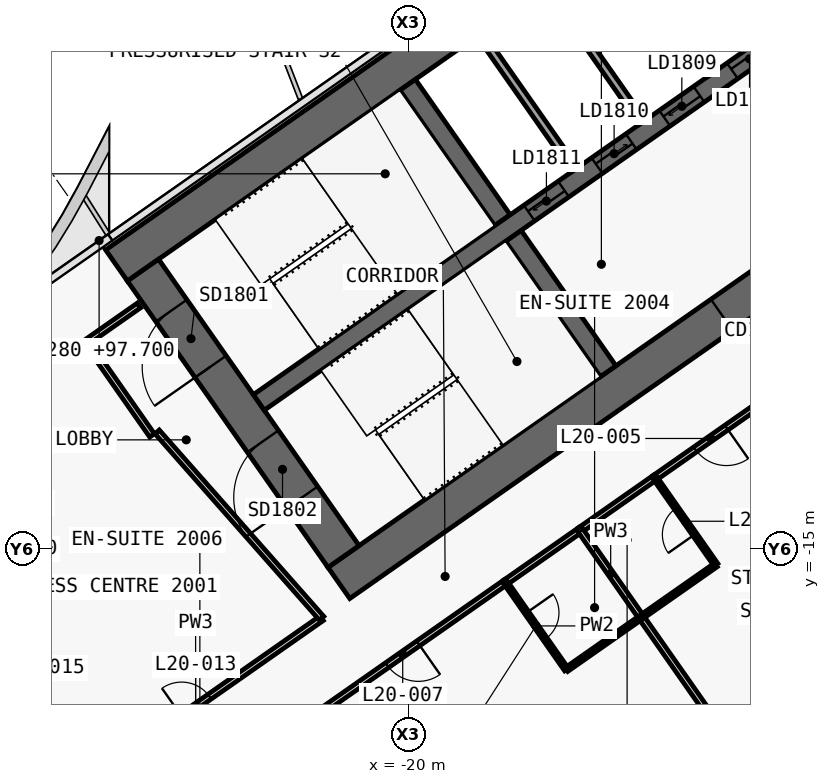
"""IFC4 building model, lengths in metres.
Left out: names, types, materials, properties, quantities, classifications, styles, units other than length and angle.
Written with IfcOpenShell. Run it as: python <this file> out.ifc"""

import sys

from ifc_helpers import new_model, si_unit, direction, frame, frame_2d, origin, place, context, subcontext, project, spatial, polyline, rectangle, outline, extrude, element, fill, save


model = new_model("IFC4")
c1 = context("Model", 3, precision=1e-05, world=origin(), true_north=direction((0.0, 1.0)))
c2 = subcontext(c1, "Body", "Model", "MODEL_VIEW")
j1 = project(units=[si_unit("LENGTHUNIT", "METRE"), si_unit("PLANEANGLEUNIT", "RADIAN")], contexts=[c1])
p1 = place(None, origin())
s1 = spatial("IfcSite", under=j1, at=p1, CompositionType="ELEMENT")
p2 = place(p1, origin())
s2 = spatial("IfcBuilding", under=s1, at=p2, CompositionType="ELEMENT")
p3 = place(p2, frame((0.0, 0.0, 97.7)))
s3 = spatial("IfcBuildingStorey", under=s2, at=p3, CompositionType="ELEMENT", Elevation=97.7)
p4 = place(p3, frame((0.037, 11.867, 0.0), z_axis=(0.0, 0.0, 1.0), x_axis=(-0.819155306259, -0.573571777746, 0.0)))
e1 = element("IfcWall", 1, at=p4, inside=s3, PredefinedType="SHEAR", context=c2, shape_type="SweptSolid", body=[
    extrude(outline(polyline([(33.837, 0.5), (0.7, 0.5), (0.0, -0.5), (33.837, -0.5), (33.837, 0.5)])), origin(), (0.0, 0.0, 1.0), 3.6),
])
p5 = place(p3, frame((0.037, -0.585, 0.0), z_axis=(0.0, 0.0, 1.0), x_axis=(-0.819157152511, -0.573569140985, 0.0)))
e2 = element("IfcWall", 2, at=p5, inside=s3, PredefinedType="SHEAR", context=c2, shape_type="SweptSolid", body=[
    extrude(outline(polyline([(26.695, 0.5), (0.7, 0.5), (0.0, -0.5), (26.695, -0.5), (26.695, 0.5)])), origin(), (0.0, 0.0, 1.0), 3.6),
])
p6 = place(p5, frame((2.995, 0.0, 0.0)))
e3 = element("IfcOpeningElement", 3, at=p6, cuts=e2, PredefinedType="OPENING", context=c2, shape_type="SweptSolid", body=[
    extrude(rectangle(XDim=2.4, YDim=2.1, at=frame_2d((1.2, 1.05))), frame((0.0, 0.51, 0.0), z_axis=(0.0, -1.0, 0.0), x_axis=(1.0, 0.0, 0.0)), (0.0, 0.0, 1.0), 1.02),
])
p7 = place(p5, frame((11.995, 0.0, 0.0)))
e4 = element("IfcOpeningElement", 4, at=p7, cuts=e2, PredefinedType="OPENING", context=c2, shape_type="SweptSolid", body=[
    extrude(rectangle(XDim=2.4, YDim=2.1, at=frame_2d((1.2, 1.05))), frame((0.0, 0.51, 0.0), z_axis=(0.0, -1.0, 0.0), x_axis=(1.0, 0.0, 0.0)), (0.0, 0.0, 1.0), 1.02),
])
p8 = place(p3, frame((-21.708, -15.2, 0.0), z_axis=(0.0, 0.0, 1.0), x_axis=(-0.573576324356, 0.819152122709, 0.0)))
e5 = element("IfcWall", 5, at=p8, inside=s3, PredefinedType="SHEAR", context=c2, shape_type="SweptSolid", body=[
    extrude(outline(polyline([(0.0, 0.5), (0.0, -0.5), (9.2, -0.5), (9.2, 0.5), (0.0, 0.5)])), origin(), (0.0, 0.0, 1.0), 3.6),
])
p9 = place(p8, frame((6.1, 0.0, 0.0)))
e6 = element("IfcOpeningElement", 6, at=p9, cuts=e5, PredefinedType="OPENING", context=c2, shape_type="SweptSolid", body=[
    extrude(rectangle(XDim=1.8, YDim=2.1, at=frame_2d((0.9, 1.05))), frame((0.0, 0.51, 0.0), z_axis=(0.0, -1.0, 0.0), x_axis=(1.0, 0.0, 0.0)), (0.0, 0.0, 1.0), 1.02),
])
p10 = place(p8, frame((1.9, 0.0, 0.0)))
e7 = element("IfcOpeningElement", 7, at=p10, cuts=e5, PredefinedType="OPENING", context=c2, shape_type="SweptSolid", body=[
    extrude(rectangle(XDim=1.8, YDim=2.1, at=frame_2d((0.9, 1.05))), frame((0.0, 0.51, 0.0), z_axis=(0.0, -1.0, 0.0), x_axis=(1.0, 0.0, 0.0)), (0.0, 0.0, 1.0), 1.02),
])
p11 = place(p3, frame((-14.745, -10.324, 0.0), z_axis=(0.0, 0.0, 1.0), x_axis=(-0.57356780395, 0.819158088694, 0.0)))
e8 = element("IfcWall", 8, at=p11, inside=s3, PredefinedType="SHEAR", context=c2, shape_type="SweptSolid", body=[
    extrude(outline(polyline([(4.35, 0.25), (0.0, 0.25), (0.0, -0.25), (4.35, -0.25), (4.35, 0.25)])), origin(), (0.0, 0.0, 1.0), 3.6),
])
p12 = place(p3, frame((-17.527, -6.352, 0.0), z_axis=(0.0, 0.0, 1.0), x_axis=(-0.573530143085, 0.819184457233, 0.0)))
e9 = element("IfcWall", 9, at=p12, inside=s3, PredefinedType="SHEAR", context=c2, shape_type="SweptSolid", body=[
    extrude(outline(polyline([(4.35, -0.25), (4.35, 0.25), (0.0, 0.25), (0.0, -0.25), (4.35, -0.25)])), origin(), (0.0, 0.0, 1.0), 3.6),
])
p13 = place(p3, frame((-2.638, 3.768, 0.0), z_axis=(0.0, 0.0, 1.0), x_axis=(-0.819148977158, -0.573580816643, 0.0)))
e10 = element("IfcWall", 10, at=p13, inside=s3, PredefinedType="SHEAR", context=c2, shape_type="SweptSolid", body=[
    extrude(outline(polyline([(26.0, 0.25), (0.0, 0.25), (0.0, -0.25), (26.0, -0.25), (26.0, 0.25)])), origin(), (0.0, 0.0, 1.0), 3.6),
])
p14 = place(p13, frame((1.169, 0.0, 0.0)))
e11 = element("IfcOpeningElement", 11, at=p14, cuts=e10, PredefinedType="OPENING", context=c2, shape_type="SweptSolid", body=[
    extrude(rectangle(XDim=1.1, YDim=2.1, at=frame_2d((0.55, 1.05))), frame((0.0, 0.26, 0.0), z_axis=(0.0, -1.0, 0.0), x_axis=(1.0, 0.0, 0.0)), (0.0, 0.0, 1.0), 0.52),
])
p15 = place(p13, frame((3.206, 0.0, 0.0)))
e12 = element("IfcOpeningElement", 12, at=p15, cuts=e10, PredefinedType="OPENING", context=c2, shape_type="SweptSolid", body=[
    extrude(rectangle(XDim=1.1, YDim=2.1, at=frame_2d((0.55, 1.05))), frame((0.0, 0.26, 0.0), z_axis=(0.0, -1.0, 0.0), x_axis=(1.0, 0.0, 0.0)), (0.0, 0.0, 1.0), 0.52),
])
p16 = place(p13, frame((5.244, 0.0, 0.0)))
e13 = element("IfcOpeningElement", 13, at=p16, cuts=e10, PredefinedType="OPENING", context=c2, shape_type="SweptSolid", body=[
    extrude(rectangle(XDim=1.1, YDim=2.1, at=frame_2d((0.55, 1.05))), frame((0.0, 0.26, 0.0), z_axis=(0.0, -1.0, 0.0), x_axis=(1.0, 0.0, 0.0)), (0.0, 0.0, 1.0), 0.52),
])
p17 = place(p13, frame((7.281, 0.0, 0.0)))
e14 = element("IfcOpeningElement", 14, at=p17, cuts=e10, PredefinedType="OPENING", context=c2, shape_type="SweptSolid", body=[
    extrude(rectangle(XDim=1.1, YDim=2.1, at=frame_2d((0.55, 1.05))), frame((0.0, 0.26, 0.0), z_axis=(0.0, -1.0, 0.0), x_axis=(1.0, 0.0, 0.0)), (0.0, 0.0, 1.0), 0.52),
])
p18 = place(p13, frame((9.688, 0.0, 0.0)))
e15 = element("IfcOpeningElement", 15, at=p18, cuts=e10, PredefinedType="OPENING", context=c2, shape_type="SweptSolid", body=[
    extrude(rectangle(XDim=1.1, YDim=2.1, at=frame_2d((0.55, 1.05))), frame((0.0, 0.26, 0.0), z_axis=(0.0, -1.0, 0.0), x_axis=(1.0, 0.0, 0.0)), (0.0, 0.0, 1.0), 0.52),
])
p19 = place(p13, frame((11.863, 0.0, 0.0)))
e16 = element("IfcOpeningElement", 16, at=p19, cuts=e10, PredefinedType="OPENING", context=c2, shape_type="SweptSolid", body=[
    extrude(rectangle(XDim=1.1, YDim=2.1, at=frame_2d((0.55, 1.05))), frame((0.0, 0.26, 0.0), z_axis=(0.0, -1.0, 0.0), x_axis=(1.0, 0.0, 0.0)), (0.0, 0.0, 1.0), 0.52),
])
p20 = place(p13, frame((14.038, 0.0, 0.0)))
e17 = element("IfcOpeningElement", 17, at=p20, cuts=e10, PredefinedType="OPENING", context=c2, shape_type="SweptSolid", body=[
    extrude(rectangle(XDim=1.1, YDim=2.1, at=frame_2d((0.55, 1.05))), frame((0.0, 0.26, 0.0), z_axis=(0.0, -1.0, 0.0), x_axis=(1.0, 0.0, 0.0)), (0.0, 0.0, 1.0), 0.52),
])
p21 = place(p13, frame((16.212, 0.0, 0.0)))
e18 = element("IfcOpeningElement", 18, at=p21, cuts=e10, PredefinedType="OPENING", context=c2, shape_type="SweptSolid", body=[
    extrude(rectangle(XDim=1.1, YDim=2.1, at=frame_2d((0.55, 1.05))), frame((0.0, 0.26, 0.0), z_axis=(0.0, -1.0, 0.0), x_axis=(1.0, 0.0, 0.0)), (0.0, 0.0, 1.0), 0.52),
])
p22 = place(p3, frame((-12.059, -2.523, 0.0), z_axis=(0.0, 0.0, 1.0), x_axis=(-0.573594173421, 0.819139624372, 0.0)))
e19 = element("IfcWall", 19, at=p22, inside=s3, PredefinedType="SOLIDWALL", context=c2, shape_type="SweptSolid", body=[
    extrude(rectangle(XDim=4.35, YDim=0.2, at=frame_2d((2.175, 0.0))), origin(), (0.0, 0.0, 1.0), 3.6),
])
p23 = place(p3, frame((-13.84, -3.771, 0.0), z_axis=(0.0, 0.0, 1.0), x_axis=(-0.57356780395, 0.819158088694, 0.0)))
e20 = element("IfcWall", 20, at=p23, inside=s3, PredefinedType="SOLIDWALL", context=c2, shape_type="SweptSolid", body=[
    extrude(rectangle(XDim=4.35, YDim=0.2, at=frame_2d((2.175, 0.0))), origin(), (0.0, 0.0, 1.0), 3.6),
])
p24 = place(p3, frame((-15.622, -5.018, 0.0), z_axis=(0.0, 0.0, 1.0), x_axis=(-0.573594173421, 0.819139624372, 0.0)))
e21 = element("IfcWall", 21, at=p24, inside=s3, PredefinedType="SOLIDWALL", context=c2, shape_type="SweptSolid", body=[
    extrude(rectangle(XDim=4.35, YDim=0.2, at=frame_2d((2.175, 0.0))), origin(), (0.0, 0.0, 1.0), 3.6),
])
p25 = place(p3, frame((-28.917, -21.469, 0.0), z_axis=(0.0, 0.0, 1.0), x_axis=(0.819152599934, 0.573575642807, 0.0)))
e22 = element("IfcWall", 22, at=p25, inside=s3, PredefinedType="PARTITIONING", context=c2, shape_type="SweptSolid", body=[
    extrude(rectangle(XDim=8.098, YDim=0.15, at=frame_2d((4.049, 0.0))), origin(), (0.0, 0.0, 1.0), 2.6),
])
p26 = place(p25, frame((3.599, 0.0, 0.0)))
e23 = element("IfcOpeningElement", 23, at=p26, cuts=e22, PredefinedType="OPENING", context=c2, shape_type="SweptSolid", body=[
    extrude(rectangle(XDim=0.9, YDim=2.1, at=frame_2d((0.45, 1.05))), frame((0.0, 0.085, 0.0), z_axis=(0.0, -1.0, 0.0), x_axis=(1.0, 0.0, 0.0)), (0.0, 0.0, 1.0), 0.17),
])
p27 = place(p3, frame((-10.565, -11.06, 0.0), z_axis=(0.0, 0.0, 1.0), x_axis=(-0.819145961204, -0.573585123798, 0.0)))
e24 = element("IfcWall", 24, at=p27, inside=s3, PredefinedType="PARTITIONING", context=c2, shape_type="SweptSolid", body=[
    extrude(rectangle(XDim=3.603, YDim=0.15, at=frame_2d((1.802, 0.0))), origin(), (0.0, 0.0, 1.0), 2.6),
])
p28 = place(p27, frame((1.302, 0.0, 0.0)))
e25 = element("IfcOpeningElement", 25, at=p28, cuts=e24, PredefinedType="OPENING", context=c2, shape_type="SweptSolid", body=[
    extrude(rectangle(XDim=1.0, YDim=2.1, at=frame_2d((0.5, 1.05))), frame((0.0, 0.085, 0.0), z_axis=(0.0, -1.0, 0.0), x_axis=(1.0, 0.0, 0.0)), (0.0, 0.0, 1.0), 0.17),
])
p29 = place(p3, frame((-13.514, -13.125, 0.0), z_axis=(0.0, 0.0, 1.0), x_axis=(-0.819146032251, -0.573585022335, 0.0)))
e26 = element("IfcWall", 26, at=p29, inside=s3, PredefinedType="PARTITIONING", context=c2, shape_type="SweptSolid", body=[
    extrude(rectangle(XDim=2.404, YDim=0.15, at=frame_2d((1.202, 0.0))), origin(), (0.0, 0.0, 1.0), 3.32),
])
p30 = place(p3, frame((-17.447, -15.879, 0.0), z_axis=(0.0, 0.0, 1.0), x_axis=(-0.819153746897, -0.573574004767, 0.0)))
e27 = element("IfcWall", 27, at=p30, inside=s3, PredefinedType="PARTITIONING", context=c2, shape_type="SweptSolid", body=[
    extrude(rectangle(XDim=6.603, YDim=0.15, at=frame_2d((3.302, 0.0))), origin(), (0.0, 0.0, 1.0), 2.6),
])
p31 = place(p30, frame((2.801, 0.0, 0.0)))
e28 = element("IfcOpeningElement", 28, at=p31, cuts=e27, PredefinedType="OPENING", context=c2, shape_type="SweptSolid", body=[
    extrude(rectangle(XDim=1.0, YDim=2.1, at=frame_2d((0.5, 1.05))), frame((0.0, 0.085, 0.0), z_axis=(0.0, -1.0, 0.0), x_axis=(1.0, 0.0, 0.0)), (0.0, 0.0, 1.0), 0.17),
])
p32 = place(p3, frame((-15.48, -14.501, 0.0), z_axis=(0.0, 0.0, 1.0), x_axis=(-0.819179439794, -0.573537309527, 0.0)))
e29 = element("IfcWall", 29, at=p32, inside=s3, PredefinedType="PARTITIONING", context=c2, shape_type="SweptSolid", body=[
    extrude(rectangle(XDim=2.404, YDim=0.15, at=frame_2d((1.202, 0.0))), origin(), (0.0, 0.0, 1.0), 3.32),
])
p33 = place(p3, frame((-26.746, -12.014, 0.0), z_axis=(0.0, 0.0, 1.0), x_axis=(-0.573560650686, 0.819163097304, 0.0)))
e30 = element("IfcWall", 30, at=p33, inside=s3, PredefinedType="PARTITIONING", context=c2, shape_type="SweptSolid", body=[
    extrude(rectangle(XDim=3.0, YDim=0.15, at=frame_2d((1.5, 0.0))), origin(), (0.0, 0.0, 1.0), 3.32),
])
p34 = place(p3, frame((-28.467, -9.556, 0.0), z_axis=(0.0, 0.0, 1.0), x_axis=(0.819109000826, 0.573637903879, 0.0)))
e31 = element("IfcWall", 31, at=p34, inside=s3, PredefinedType="PARTITIONING", context=c2, shape_type="SweptSolid", body=[
    extrude(rectangle(XDim=1.68, YDim=0.15, at=frame_2d((0.84, 0.0))), origin(), (0.0, 0.0, 1.0), 3.32),
])
p35 = place(p3, frame((-22.284, -16.827, 0.0), z_axis=(0.0, 0.0, 1.0), x_axis=(-0.661545117561, 0.749905365651, 0.0)))
e32 = element("IfcWall", 32, at=p35, inside=s3, PredefinedType="PARTITIONING", context=c2, shape_type="SweptSolid", body=[
    extrude(rectangle(XDim=6.543, YDim=0.15, at=frame_2d((3.271, 0.0))), origin(), (0.0, 0.0, 1.0), 2.6),
])
p36 = place(p3, frame((-13.875, -16.797, 0.0), z_axis=(0.0, 0.0, 1.0), x_axis=(0.819141114317, 0.573592045652, 0.0)))
e33 = element("IfcWall", 33, at=p36, inside=s3, PredefinedType="PARTITIONING", context=c2, shape_type="SweptSolid", body=[
    extrude(rectangle(XDim=2.4, YDim=0.12, at=frame_2d((1.2, 0.0))), origin(), (0.0, 0.0, 1.0), 3.32),
])
p37 = place(p3, frame((-11.909, -15.419, 0.0), z_axis=(0.0, 0.0, 1.0), x_axis=(-0.573591086599, 0.819141785879, 0.0)))
e34 = element("IfcWall", 34, at=p37, inside=s3, PredefinedType="PARTITIONING", context=c2, shape_type="SweptSolid", body=[
    extrude(rectangle(XDim=2.8, YDim=0.12, at=frame_2d((1.4, 0.0))), origin(), (0.0, 0.0, 1.0), 3.32),
])
p38 = place(p37, frame((0.975, 0.0, 0.0)))
e35 = element("IfcOpeningElement", 35, at=p38, cuts=e34, PredefinedType="OPENING", context=c2, shape_type="SweptSolid", body=[
    extrude(rectangle(XDim=0.85, YDim=2.05, at=frame_2d((0.425, 1.025))), frame((0.0, 0.07, 0.0), z_axis=(0.0, -1.0, 0.0), x_axis=(1.0, 0.0, 0.0)), (0.0, 0.0, 1.0), 0.14),
])
p39 = place(p3, frame((-11.294, -20.482, 0.0), z_axis=(0.0, 0.0, 1.0), x_axis=(-0.573589807488, 0.819142681555, 0.0)))
e36 = element("IfcWall", 36, at=p39, inside=s3, PredefinedType="PARTITIONING", context=c2, shape_type="SweptSolid", body=[
    extrude(rectangle(XDim=4.499, YDim=0.15, at=frame_2d((2.25, 0.0))), origin(), (0.0, 0.0, 1.0), 2.5),
])
p40 = place(p3, frame((-13.875, -16.796, 0.0), z_axis=(0.0, 0.0, 1.0), x_axis=(-0.573591086599, 0.819141785879, 0.0)))
e37 = element("IfcWall", 37, at=p40, inside=s3, PredefinedType="PARTITIONING", context=c2, shape_type="SweptSolid", body=[
    extrude(rectangle(XDim=2.8, YDim=0.15, at=frame_2d((1.4, 0.0))), origin(), (0.0, 0.0, 1.0), 3.32),
])
p41 = place(p3, frame((-17.448, -15.88, 0.0), z_axis=(0.0, 0.0, 1.0), x_axis=(0.573550118428, -0.819170471667, 0.0)))
e38 = element("IfcWall", 38, at=p41, inside=s3, PredefinedType="PARTITIONING", context=c2, shape_type="SweptSolid", body=[
    extrude(rectangle(XDim=2.8, YDim=0.12, at=frame_2d((1.4, 0.0))), origin(), (0.0, 0.0, 1.0), 3.32),
])
p42 = place(p41, frame((0.975, 0.0, 0.0)))
e39 = element("IfcOpeningElement", 39, at=p42, cuts=e38, PredefinedType="OPENING", context=c2, shape_type="SweptSolid", body=[
    extrude(rectangle(XDim=0.85, YDim=2.05, at=frame_2d((0.425, 1.025))), frame((0.0, 0.07, 0.0), z_axis=(0.0, -1.0, 0.0), x_axis=(1.0, 0.0, 0.0)), (0.0, 0.0, 1.0), 0.14),
])
p43 = place(p3, frame((-15.841, -18.174, 0.0), z_axis=(0.0, 0.0, 1.0), x_axis=(0.819155442668, 0.573571582932, 0.0)))
e40 = element("IfcWall", 40, at=p43, inside=s3, PredefinedType="PARTITIONING", context=c2, shape_type="SweptSolid", body=[
    extrude(rectangle(XDim=2.4, YDim=0.12, at=frame_2d((1.2, 0.0))), origin(), (0.0, 0.0, 1.0), 3.32),
])
p44 = place(p18, origin())
e41 = element("IfcDoor", 41, at=p44, inside=s3, OperationType="SLIDING_TO_LEFT", PredefinedType="DOOR", context=c2, shape_type="SweptSolid", body=[
    extrude(rectangle(XDim=1.1, YDim=2.1, at=frame_2d((0.55, 1.05))), frame((0.0, 0.025, 0.0), z_axis=(0.0, -1.0, 0.0), x_axis=(1.0, 0.0, 0.0)), (0.0, 0.0, 1.0), 0.05),
])
fill(e15, e41)
p45 = place(p19, origin())
e42 = element("IfcDoor", 42, at=p45, inside=s3, OperationType="SLIDING_TO_RIGHT", PredefinedType="DOOR", context=c2, shape_type="SweptSolid", body=[
    extrude(rectangle(XDim=1.1, YDim=2.1, at=frame_2d((0.55, 1.05))), frame((0.0, 0.025, 0.0), z_axis=(0.0, -1.0, 0.0), x_axis=(1.0, 0.0, 0.0)), (0.0, 0.0, 1.0), 0.05),
])
fill(e16, e42)
p46 = place(p20, origin())
e43 = element("IfcDoor", 43, at=p46, inside=s3, OperationType="SLIDING_TO_LEFT", PredefinedType="DOOR", context=c2, shape_type="SweptSolid", body=[
    extrude(rectangle(XDim=1.1, YDim=2.1, at=frame_2d((0.55, 1.05))), frame((0.0, 0.025, 0.0), z_axis=(0.0, -1.0, 0.0), x_axis=(1.0, 0.0, 0.0)), (0.0, 0.0, 1.0), 0.05),
])
fill(e17, e43)
p47 = place(p21, origin())
e44 = element("IfcDoor", 44, at=p47, inside=s3, OperationType="SLIDING_TO_RIGHT", PredefinedType="DOOR", context=c2, shape_type="SweptSolid", body=[
    extrude(rectangle(XDim=1.1, YDim=2.1, at=frame_2d((0.55, 1.05))), frame((0.0, 0.025, 0.0), z_axis=(0.0, -1.0, 0.0), x_axis=(1.0, 0.0, 0.0)), (0.0, 0.0, 1.0), 0.05),
])
fill(e18, e44)
p48 = place(p7, origin())
e45 = element("IfcDoor", 45, at=p48, inside=s3, OperationType="DOUBLE_DOOR_SINGLE_SWING", PredefinedType="DOOR", context=c2, shape_type="SweptSolid", body=[
    extrude(rectangle(XDim=2.4, YDim=2.1, at=frame_2d((1.2, 1.05))), frame((0.0, 0.025, 0.0), z_axis=(0.0, -1.0, 0.0), x_axis=(1.0, 0.0, 0.0)), (0.0, 0.0, 1.0), 0.05),
])
fill(e4, e45)
p49 = place(p9, origin())
e46 = element("IfcDoor", 46, at=p49, inside=s3, OperationType="DOUBLE_DOOR_SINGLE_SWING", PredefinedType="DOOR", context=c2, shape_type="SweptSolid", body=[
    extrude(rectangle(XDim=1.8, YDim=2.1, at=frame_2d((0.9, 1.05))), frame((0.0, 0.025, 0.0), z_axis=(0.0, -1.0, 0.0), x_axis=(1.0, 0.0, 0.0)), (0.0, 0.0, 1.0), 0.05),
])
fill(e6, e46)
p50 = place(p10, origin())
e47 = element("IfcDoor", 47, at=p50, inside=s3, OperationType="DOUBLE_DOOR_SINGLE_SWING", PredefinedType="DOOR", context=c2, shape_type="SweptSolid", body=[
    extrude(rectangle(XDim=1.8, YDim=2.1, at=frame_2d((0.9, 1.05))), frame((0.0, 0.025, 0.0), z_axis=(0.0, -1.0, 0.0), x_axis=(1.0, 0.0, 0.0)), (0.0, 0.0, 1.0), 0.05),
])
fill(e7, e47)
p51 = place(p38, origin())
e48 = element("IfcDoor", 48, at=p51, inside=s3, OperationType="SINGLE_SWING_RIGHT", PredefinedType="DOOR", context=c2, shape_type="SweptSolid", body=[
    extrude(rectangle(XDim=0.85, YDim=2.05, at=frame_2d((0.425, 1.025))), frame((0.0, 0.025, 0.0), z_axis=(0.0, -1.0, 0.0), x_axis=(1.0, 0.0, 0.0)), (0.0, 0.0, 1.0), 0.05),
])
fill(e35, e48)
p52 = place(p28, origin())
e49 = element("IfcDoor", 49, at=p52, inside=s3, OperationType="SINGLE_SWING_LEFT", PredefinedType="DOOR", context=c2, shape_type="SweptSolid", body=[
    extrude(rectangle(XDim=1.0, YDim=2.1, at=frame_2d((0.5, 1.05))), frame((0.0, 0.025, 0.0), z_axis=(0.0, -1.0, 0.0), x_axis=(1.0, 0.0, 0.0)), (0.0, 0.0, 1.0), 0.05),
])
fill(e25, e49)
p53 = place(p42, origin())
e50 = element("IfcDoor", 50, at=p53, inside=s3, OperationType="SINGLE_SWING_RIGHT", PredefinedType="DOOR", context=c2, shape_type="SweptSolid", body=[
    extrude(rectangle(XDim=0.85, YDim=2.05, at=frame_2d((0.425, 1.025))), frame((0.0, 0.025, 0.0), z_axis=(0.0, -1.0, 0.0), x_axis=(1.0, 0.0, 0.0)), (0.0, 0.0, 1.0), 0.05),
])
fill(e39, e50)
p54 = place(p31, origin())
e51 = element("IfcDoor", 51, at=p54, inside=s3, OperationType="SINGLE_SWING_RIGHT", PredefinedType="DOOR", context=c2, shape_type="SweptSolid", body=[
    extrude(rectangle(XDim=1.0, YDim=2.1, at=frame_2d((0.5, 1.05))), frame((0.0, 0.025, 0.0), z_axis=(0.0, -1.0, 0.0), x_axis=(1.0, 0.0, 0.0)), (0.0, 0.0, 1.0), 0.05),
])
fill(e28, e51)
p55 = place(p26, origin())
e52 = element("IfcDoor", 52, at=p55, inside=s3, OperationType="SINGLE_SWING_LEFT", PredefinedType="DOOR", context=c2, shape_type="SweptSolid", body=[
    extrude(rectangle(XDim=0.9, YDim=2.1, at=frame_2d((0.45, 1.05))), frame((0.0, 0.025, 0.0), z_axis=(0.0, -1.0, 0.0), x_axis=(1.0, 0.0, 0.0)), (0.0, 0.0, 1.0), 0.05),
])
fill(e23, e52)
save(model, sys.argv[1])
